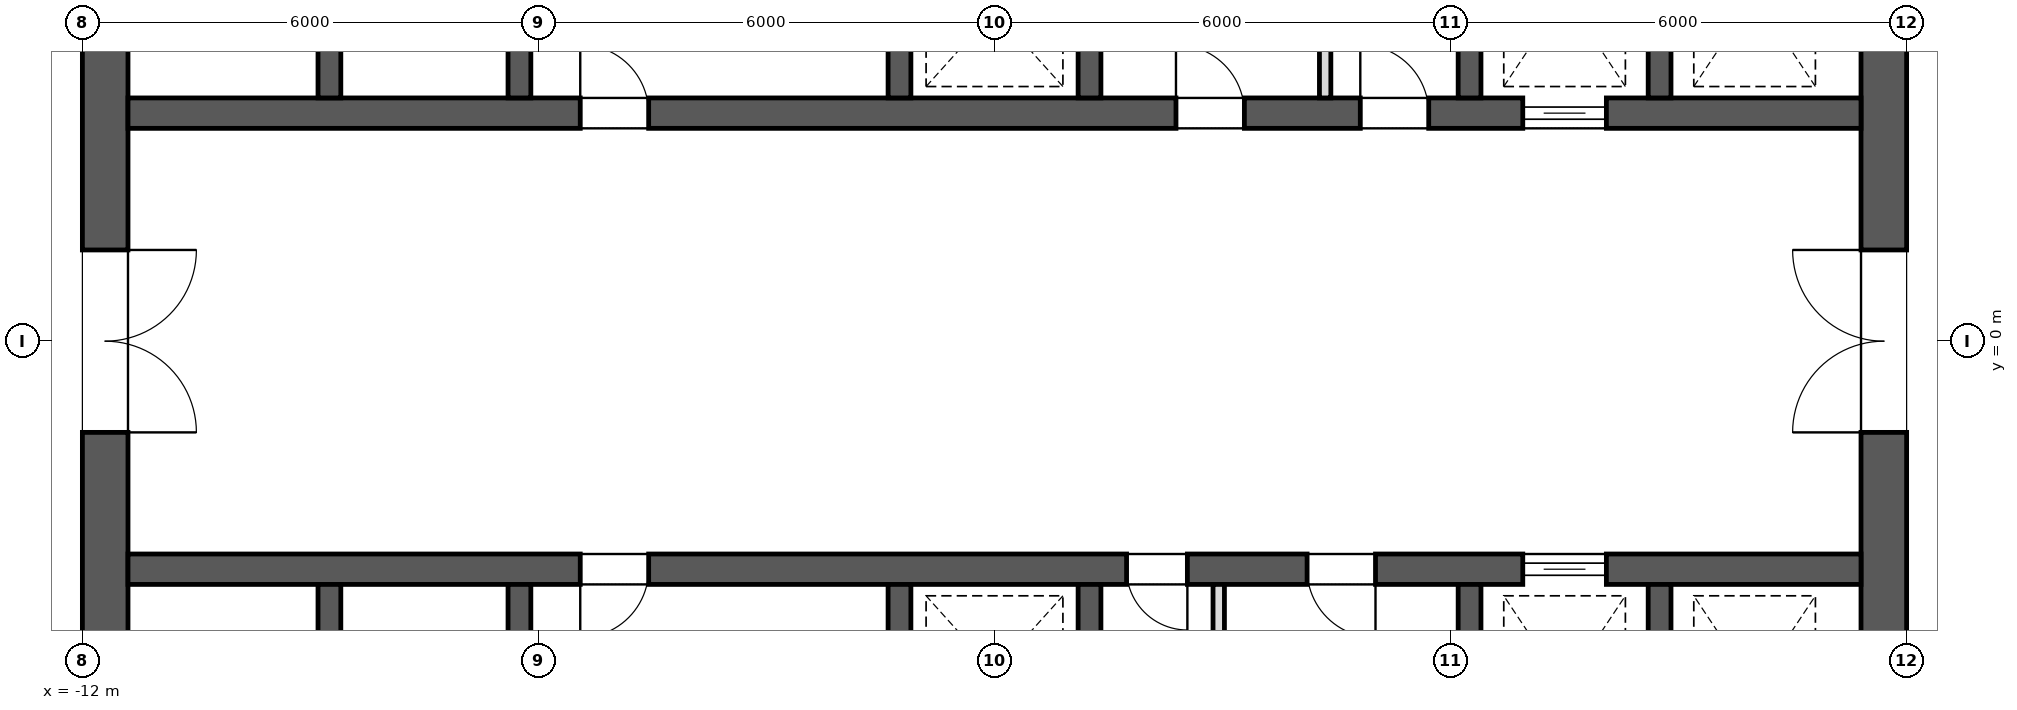
"""IFC4 building model, lengths in metres.
Left out: names, types, materials, properties, quantities, classifications, styles, units other than length and angle.
Written with IfcOpenShell. Run it as: python <this file> out.ifc"""

import sys

from ifc_helpers import new_model, si_unit, direction, frame, frame_2d, origin, place, context, subcontext, project, spatial, rectangle, extrude, element, fill, save


model = new_model("IFC4")
c1 = context("Model", 3, precision=1e-05, world=origin(), true_north=direction((0.0, 1.0)))
c2 = subcontext(c1, "Body", "Model", "MODEL_VIEW")
j1 = project(units=[si_unit("LENGTHUNIT", "METRE"), si_unit("PLANEANGLEUNIT", "RADIAN")], contexts=[c1])
p1 = place(None, origin())
s1 = spatial("IfcSite", under=j1, at=p1, CompositionType="ELEMENT")
p2 = place(p1, origin())
s2 = spatial("IfcBuilding", under=s1, at=p2, CompositionType="ELEMENT")
p3 = place(p2, frame((0.0, 0.0, 338.3)))
s3 = spatial("IfcBuildingStorey", under=s2, at=p3, CompositionType="ELEMENT", Elevation=338.3)
p4 = place(p3, frame((11.7, -11.4, 0.0), z_axis=(0.0, 0.0, 1.0), x_axis=(0.0, 1.0, 0.0)))
e1 = element("IfcWall", 1, at=p4, inside=s3, PredefinedType="SHEAR", context=c2, shape_type="SweptSolid", body=[
    extrude(rectangle(XDim=22.8, YDim=0.6, at=frame_2d((11.4, 0.0))), origin(), (0.0, 0.0, 1.0), 5.0),
])
p5 = place(p4, frame((10.2, 0.0, 0.0)))
e2 = element("IfcOpeningElement", 2, at=p5, cuts=e1, PredefinedType="OPENING", context=c2, shape_type="SweptSolid", body=[
    extrude(rectangle(XDim=2.4, YDim=2.1, at=frame_2d((1.2, 1.05))), frame((0.0, 0.312, 0.0), z_axis=(0.0, -1.0, 0.0), x_axis=(1.0, 0.0, 0.0)), (0.0, 0.0, 1.0), 0.624),
])
p6 = place(p4, frame((19.5, 0.0, 0.0)))
e3 = element("IfcOpeningElement", 3, at=p6, cuts=e1, PredefinedType="OPENING", context=c2, shape_type="SweptSolid", body=[
    extrude(rectangle(XDim=1.2, YDim=2.1, at=frame_2d((0.6, 1.05))), frame((0.0, 0.312, 0.0), z_axis=(0.0, -1.0, 0.0), x_axis=(1.0, 0.0, 0.0)), (0.0, 0.0, 1.0), 0.624),
])
p7 = place(p4, frame((2.1, 0.0, 0.0)))
e4 = element("IfcOpeningElement", 4, at=p7, cuts=e1, PredefinedType="OPENING", context=c2, shape_type="SweptSolid", body=[
    extrude(rectangle(XDim=1.2, YDim=2.1, at=frame_2d((0.6, 1.05))), frame((0.0, 0.312, 0.0), z_axis=(0.0, -1.0, 0.0), x_axis=(1.0, 0.0, 0.0)), (0.0, 0.0, 1.0), 0.624),
])
p8 = place(p3, frame((-11.7, -11.4, 0.0), z_axis=(0.0, 0.0, 1.0), x_axis=(0.0, 1.0, 0.0)))
e5 = element("IfcWall", 5, at=p8, inside=s3, PredefinedType="SHEAR", context=c2, shape_type="SweptSolid", body=[
    extrude(rectangle(XDim=22.8, YDim=0.6, at=frame_2d((11.4, 0.0))), origin(), (0.0, 0.0, 1.0), 5.0),
])
p9 = place(p8, frame((10.2, 0.0, 0.0)))
e6 = element("IfcOpeningElement", 6, at=p9, cuts=e5, PredefinedType="OPENING", context=c2, shape_type="SweptSolid", body=[
    extrude(rectangle(XDim=2.4, YDim=2.1, at=frame_2d((1.2, 1.05))), frame((0.0, 0.312, 0.0), z_axis=(0.0, -1.0, 0.0), x_axis=(1.0, 0.0, 0.0)), (0.0, 0.0, 1.0), 0.624),
])
p10 = place(p8, frame((18.925, 0.0, 0.0)))
e7 = element("IfcOpeningElement", 7, at=p10, cuts=e5, PredefinedType="OPENING", context=c2, shape_type="SweptSolid", body=[
    extrude(rectangle(XDim=1.2, YDim=2.1, at=frame_2d((0.6, 1.05))), frame((0.0, 0.312, 0.0), z_axis=(0.0, -1.0, 0.0), x_axis=(1.0, 0.0, 0.0)), (0.0, 0.0, 1.0), 0.624),
])
p11 = place(p8, frame((2.675, 0.0, 0.0)))
e8 = element("IfcOpeningElement", 8, at=p11, cuts=e5, PredefinedType="OPENING", context=c2, shape_type="SweptSolid", body=[
    extrude(rectangle(XDim=1.2, YDim=2.1, at=frame_2d((0.6, 1.05))), frame((0.0, 0.312, 0.0), z_axis=(0.0, -1.0, 0.0), x_axis=(1.0, 0.0, 0.0)), (0.0, 0.0, 1.0), 0.624),
])
p12 = place(p3, frame((-11.4, 3.0, 0.0), z_axis=(0.0, 0.0, 1.0), x_axis=(1.0, 0.0, 0.0)))
e9 = element("IfcWall", 9, at=p12, inside=s3, PredefinedType="SHEAR", context=c2, shape_type="SweptSolid", body=[
    extrude(rectangle(XDim=22.8, YDim=0.4, at=frame_2d((11.4, 0.0))), origin(), (0.0, 0.0, 1.0), 5.0),
])
p13 = place(p12, frame((18.35, 0.0, 0.0)))
e10 = element("IfcOpeningElement", 10, at=p13, cuts=e9, PredefinedType="OPENING", context=c2, shape_type="SweptSolid", body=[
    extrude(rectangle(XDim=1.1, YDim=2.1, at=frame_2d((0.55, 1.05))), frame((0.0, 0.212, 0.0), z_axis=(0.0, -1.0, 0.0), x_axis=(1.0, 0.0, 0.0)), (0.0, 0.0, 1.0), 0.424),
])
p14 = place(p12, frame((13.788, 0.0, 0.0)))
e11 = element("IfcOpeningElement", 11, at=p14, cuts=e9, PredefinedType="OPENING", context=c2, shape_type="SweptSolid", body=[
    extrude(rectangle(XDim=0.9, YDim=2.1, at=frame_2d((0.45, 1.05))), frame((0.0, 0.212, 0.0), z_axis=(0.0, -1.0, 0.0), x_axis=(1.0, 0.0, 0.0)), (0.0, 0.0, 1.0), 0.424),
])
p15 = place(p12, frame((16.212, 0.0, 0.0)))
e12 = element("IfcOpeningElement", 12, at=p15, cuts=e9, PredefinedType="OPENING", context=c2, shape_type="SweptSolid", body=[
    extrude(rectangle(XDim=0.9, YDim=2.1, at=frame_2d((0.45, 1.05))), frame((0.0, 0.212, 0.0), z_axis=(0.0, -1.0, 0.0), x_axis=(1.0, 0.0, 0.0)), (0.0, 0.0, 1.0), 0.424),
])
p16 = place(p12, frame((5.95, 0.0, 0.0)))
e13 = element("IfcOpeningElement", 13, at=p16, cuts=e9, PredefinedType="OPENING", context=c2, shape_type="SweptSolid", body=[
    extrude(rectangle(XDim=0.9, YDim=2.1, at=frame_2d((0.45, 1.05))), frame((0.0, 0.212, 0.0), z_axis=(0.0, -1.0, 0.0), x_axis=(1.0, 0.0, 0.0)), (0.0, 0.0, 1.0), 0.424),
])
for number, where, z_axis, x_axis in (
    (14, (-8.75, 3.2, 0.0), (0.0, 0.0, 1.0), (0.0, 1.0, 0.0)),
    (15, (-6.25, 3.2, 0.0), (0.0, 0.0, 1.0), (0.0, 1.0, 0.0)),
    (16, (-1.25, 3.2, 0.0), (0.0, 0.0, 1.0), (0.0, 1.0, 0.0)),
    (17, (1.25, 3.2, 0.0), (0.0, 0.0, 1.0), (0.0, 1.0, 0.0)),
    (18, (6.25, 3.2, 0.0), (0.0, 0.0, 1.0), (0.0, 1.0, 0.0)),
    (19, (8.75, 3.2, 0.0), (0.0, 0.0, 1.0), (0.0, 1.0, 0.0)),
):
    element("IfcWall", number, at=place(p3, frame(where, z_axis=z_axis, x_axis=x_axis)), inside=s3, PredefinedType="SHEAR", context=c2, shape_type="SweptSolid", body=[
        extrude(rectangle(XDim=2.9, YDim=0.3, at=frame_2d((1.45, 0.0))), origin(), (0.0, 0.0, 1.0), 5.0),
    ])
p17 = place(p3, frame((-11.4, -3.0, 0.0), z_axis=(0.0, 0.0, 1.0), x_axis=(1.0, 0.0, 0.0)))
e20 = element("IfcWall", 20, at=p17, inside=s3, PredefinedType="SHEAR", context=c2, shape_type="SweptSolid", body=[
    extrude(rectangle(XDim=22.8, YDim=0.4, at=frame_2d((11.4, 0.0))), origin(), (0.0, 0.0, 1.0), 5.0),
])
p18 = place(p17, frame((18.35, 0.0, 0.0)))
e21 = element("IfcOpeningElement", 21, at=p18, cuts=e20, PredefinedType="OPENING", context=c2, shape_type="SweptSolid", body=[
    extrude(rectangle(XDim=1.1, YDim=2.1, at=frame_2d((0.55, 1.05))), frame((0.0, 0.212, 0.0), z_axis=(0.0, -1.0, 0.0), x_axis=(1.0, 0.0, 0.0)), (0.0, 0.0, 1.0), 0.424),
])
p19 = place(p17, frame((13.137, 0.0, 0.0)))
e22 = element("IfcOpeningElement", 22, at=p19, cuts=e20, PredefinedType="OPENING", context=c2, shape_type="SweptSolid", body=[
    extrude(rectangle(XDim=0.8, YDim=2.1, at=frame_2d((0.4, 1.05))), frame((0.0, 0.212, 0.0), z_axis=(0.0, -1.0, 0.0), x_axis=(1.0, 0.0, 0.0)), (0.0, 0.0, 1.0), 0.424),
])
p20 = place(p17, frame((15.512, 0.0, 0.0)))
e23 = element("IfcOpeningElement", 23, at=p20, cuts=e20, PredefinedType="OPENING", context=c2, shape_type="SweptSolid", body=[
    extrude(rectangle(XDim=0.9, YDim=2.1, at=frame_2d((0.45, 1.05))), frame((0.0, 0.212, 0.0), z_axis=(0.0, -1.0, 0.0), x_axis=(1.0, 0.0, 0.0)), (0.0, 0.0, 1.0), 0.424),
])
p21 = place(p17, frame((5.95, 0.0, 0.0)))
e24 = element("IfcOpeningElement", 24, at=p21, cuts=e20, PredefinedType="OPENING", context=c2, shape_type="SweptSolid", body=[
    extrude(rectangle(XDim=0.9, YDim=2.1, at=frame_2d((0.45, 1.05))), frame((0.0, 0.212, 0.0), z_axis=(0.0, -1.0, 0.0), x_axis=(1.0, 0.0, 0.0)), (0.0, 0.0, 1.0), 0.424),
])
for number, where, z_axis, x_axis in (
    (25, (-8.75, -6.1, 0.0), (0.0, 0.0, 1.0), (0.0, 1.0, 0.0)),
    (26, (-6.25, -6.1, 0.0), (0.0, 0.0, 1.0), (0.0, 1.0, 0.0)),
    (27, (-1.25, -6.1, 0.0), (0.0, 0.0, 1.0), (0.0, 1.0, 0.0)),
    (28, (1.25, -6.1, 0.0), (0.0, 0.0, 1.0), (0.0, 1.0, 0.0)),
    (29, (6.25, -6.1, 0.0), (0.0, 0.0, 1.0), (0.0, 1.0, 0.0)),
    (30, (8.75, -6.1, 0.0), (0.0, 0.0, 1.0), (0.0, 1.0, 0.0)),
):
    element("IfcWall", number, at=place(p3, frame(where, z_axis=z_axis, x_axis=x_axis)), inside=s3, PredefinedType="SHEAR", context=c2, shape_type="SweptSolid", body=[
        extrude(rectangle(XDim=2.9, YDim=0.3, at=frame_2d((1.45, 0.0))), origin(), (0.0, 0.0, 1.0), 5.0),
    ])
for number, where, z_axis, x_axis in (
    (31, (4.35, 3.2, 0.0), (0.0, 0.0, 1.0), (0.0, 1.0, 0.0)),
    (32, (2.95, -6.1, 0.0), (0.0, 0.0, 1.0), (0.0, 1.0, 0.0)),
):
    element("IfcWall", number, at=place(p3, frame(where, z_axis=z_axis, x_axis=x_axis)), inside=s3, PredefinedType="PARTITIONING", context=c2, shape_type="SweptSolid", body=[
        extrude(rectangle(XDim=2.9, YDim=0.15, at=frame_2d((1.45, 0.0))), origin(), (0.0, 0.0, 1.0), 4.65),
    ])
p22 = place(p13, origin())
e33 = element("IfcDoor", 33, at=p22, inside=s3, OperationType="SLIDING_TO_LEFT", PredefinedType="DOOR", context=c2, shape_type="SweptSolid", body=[
    extrude(rectangle(XDim=1.1, YDim=2.1, at=frame_2d((0.55, 1.05))), frame((0.0, 0.025, 0.0), z_axis=(0.0, -1.0, 0.0), x_axis=(1.0, 0.0, 0.0)), (0.0, 0.0, 1.0), 0.05),
])
fill(e10, e33)
p23 = place(p18, origin())
e34 = element("IfcDoor", 34, at=p23, inside=s3, OperationType="SLIDING_TO_LEFT", PredefinedType="DOOR", context=c2, shape_type="SweptSolid", body=[
    extrude(rectangle(XDim=1.1, YDim=2.1, at=frame_2d((0.55, 1.05))), frame((0.0, 0.025, 0.0), z_axis=(0.0, -1.0, 0.0), x_axis=(1.0, 0.0, 0.0)), (0.0, 0.0, 1.0), 0.05),
])
fill(e21, e34)
p24 = place(p9, frame((2.4, 0.0, 0.0), z_axis=(0.0, 0.0, 1.0), x_axis=(-1.0, 0.0, 0.0)))
e35 = element("IfcDoor", 35, at=p24, inside=s3, OperationType="DOUBLE_DOOR_SINGLE_SWING", PredefinedType="DOOR", context=c2, shape_type="SweptSolid", body=[
    extrude(rectangle(XDim=2.4, YDim=2.1, at=frame_2d((1.2, 1.05))), frame((0.0, 0.025, 0.0), z_axis=(0.0, -1.0, 0.0), x_axis=(1.0, 0.0, 0.0)), (0.0, 0.0, 1.0), 0.05),
])
fill(e6, e35)
p25 = place(p5, origin())
e36 = element("IfcDoor", 36, at=p25, inside=s3, OperationType="DOUBLE_DOOR_SINGLE_SWING", PredefinedType="DOOR", context=c2, shape_type="SweptSolid", body=[
    extrude(rectangle(XDim=2.4, YDim=2.1, at=frame_2d((1.2, 1.05))), frame((0.0, 0.025, 0.0), z_axis=(0.0, -1.0, 0.0), x_axis=(1.0, 0.0, 0.0)), (0.0, 0.0, 1.0), 0.05),
])
fill(e2, e36)
p26 = place(p14, origin())
e37 = element("IfcDoor", 37, at=p26, inside=s3, OperationType="SINGLE_SWING_RIGHT", PredefinedType="DOOR", context=c2, shape_type="SweptSolid", body=[
    extrude(rectangle(XDim=0.9, YDim=2.1, at=frame_2d((0.45, 1.05))), frame((0.0, 0.025, 0.0), z_axis=(0.0, -1.0, 0.0), x_axis=(1.0, 0.0, 0.0)), (0.0, 0.0, 1.0), 0.05),
])
fill(e11, e37)
p27 = place(p15, origin())
e38 = element("IfcDoor", 38, at=p27, inside=s3, OperationType="SINGLE_SWING_RIGHT", PredefinedType="DOOR", context=c2, shape_type="SweptSolid", body=[
    extrude(rectangle(XDim=0.9, YDim=2.1, at=frame_2d((0.45, 1.05))), frame((0.0, 0.025, 0.0), z_axis=(0.0, -1.0, 0.0), x_axis=(1.0, 0.0, 0.0)), (0.0, 0.0, 1.0), 0.05),
])
fill(e12, e38)
p28 = place(p16, origin())
e39 = element("IfcDoor", 39, at=p28, inside=s3, OperationType="SINGLE_SWING_RIGHT", PredefinedType="DOOR", context=c2, shape_type="SweptSolid", body=[
    extrude(rectangle(XDim=0.9, YDim=2.1, at=frame_2d((0.45, 1.05))), frame((0.0, 0.025, 0.0), z_axis=(0.0, -1.0, 0.0), x_axis=(1.0, 0.0, 0.0)), (0.0, 0.0, 1.0), 0.05),
])
fill(e13, e39)
p29 = place(p19, frame((0.8, 0.0, 0.0), z_axis=(0.0, 0.0, 1.0), x_axis=(-1.0, 0.0, 0.0)))
e40 = element("IfcDoor", 40, at=p29, inside=s3, OperationType="SINGLE_SWING_RIGHT", PredefinedType="DOOR", context=c2, shape_type="SweptSolid", body=[
    extrude(rectangle(XDim=0.8, YDim=2.1, at=frame_2d((0.4, 1.05))), frame((0.0, 0.025, 0.0), z_axis=(0.0, -1.0, 0.0), x_axis=(1.0, 0.0, 0.0)), (0.0, 0.0, 1.0), 0.05),
])
fill(e22, e40)
p30 = place(p20, frame((0.9, 0.0, 0.0), z_axis=(0.0, 0.0, 1.0), x_axis=(-1.0, 0.0, 0.0)))
e41 = element("IfcDoor", 41, at=p30, inside=s3, OperationType="SINGLE_SWING_RIGHT", PredefinedType="DOOR", context=c2, shape_type="SweptSolid", body=[
    extrude(rectangle(XDim=0.9, YDim=2.1, at=frame_2d((0.45, 1.05))), frame((0.0, 0.025, 0.0), z_axis=(0.0, -1.0, 0.0), x_axis=(1.0, 0.0, 0.0)), (0.0, 0.0, 1.0), 0.05),
])
fill(e23, e41)
p31 = place(p21, frame((0.9, 0.0, 0.0), z_axis=(0.0, 0.0, 1.0), x_axis=(-1.0, 0.0, 0.0)))
e42 = element("IfcDoor", 42, at=p31, inside=s3, OperationType="SINGLE_SWING_LEFT", PredefinedType="DOOR", context=c2, shape_type="SweptSolid", body=[
    extrude(rectangle(XDim=0.9, YDim=2.1, at=frame_2d((0.45, 1.05))), frame((0.0, 0.025, 0.0), z_axis=(0.0, -1.0, 0.0), x_axis=(1.0, 0.0, 0.0)), (0.0, 0.0, 1.0), 0.05),
])
fill(e24, e42)
save(model, sys.argv[1])
